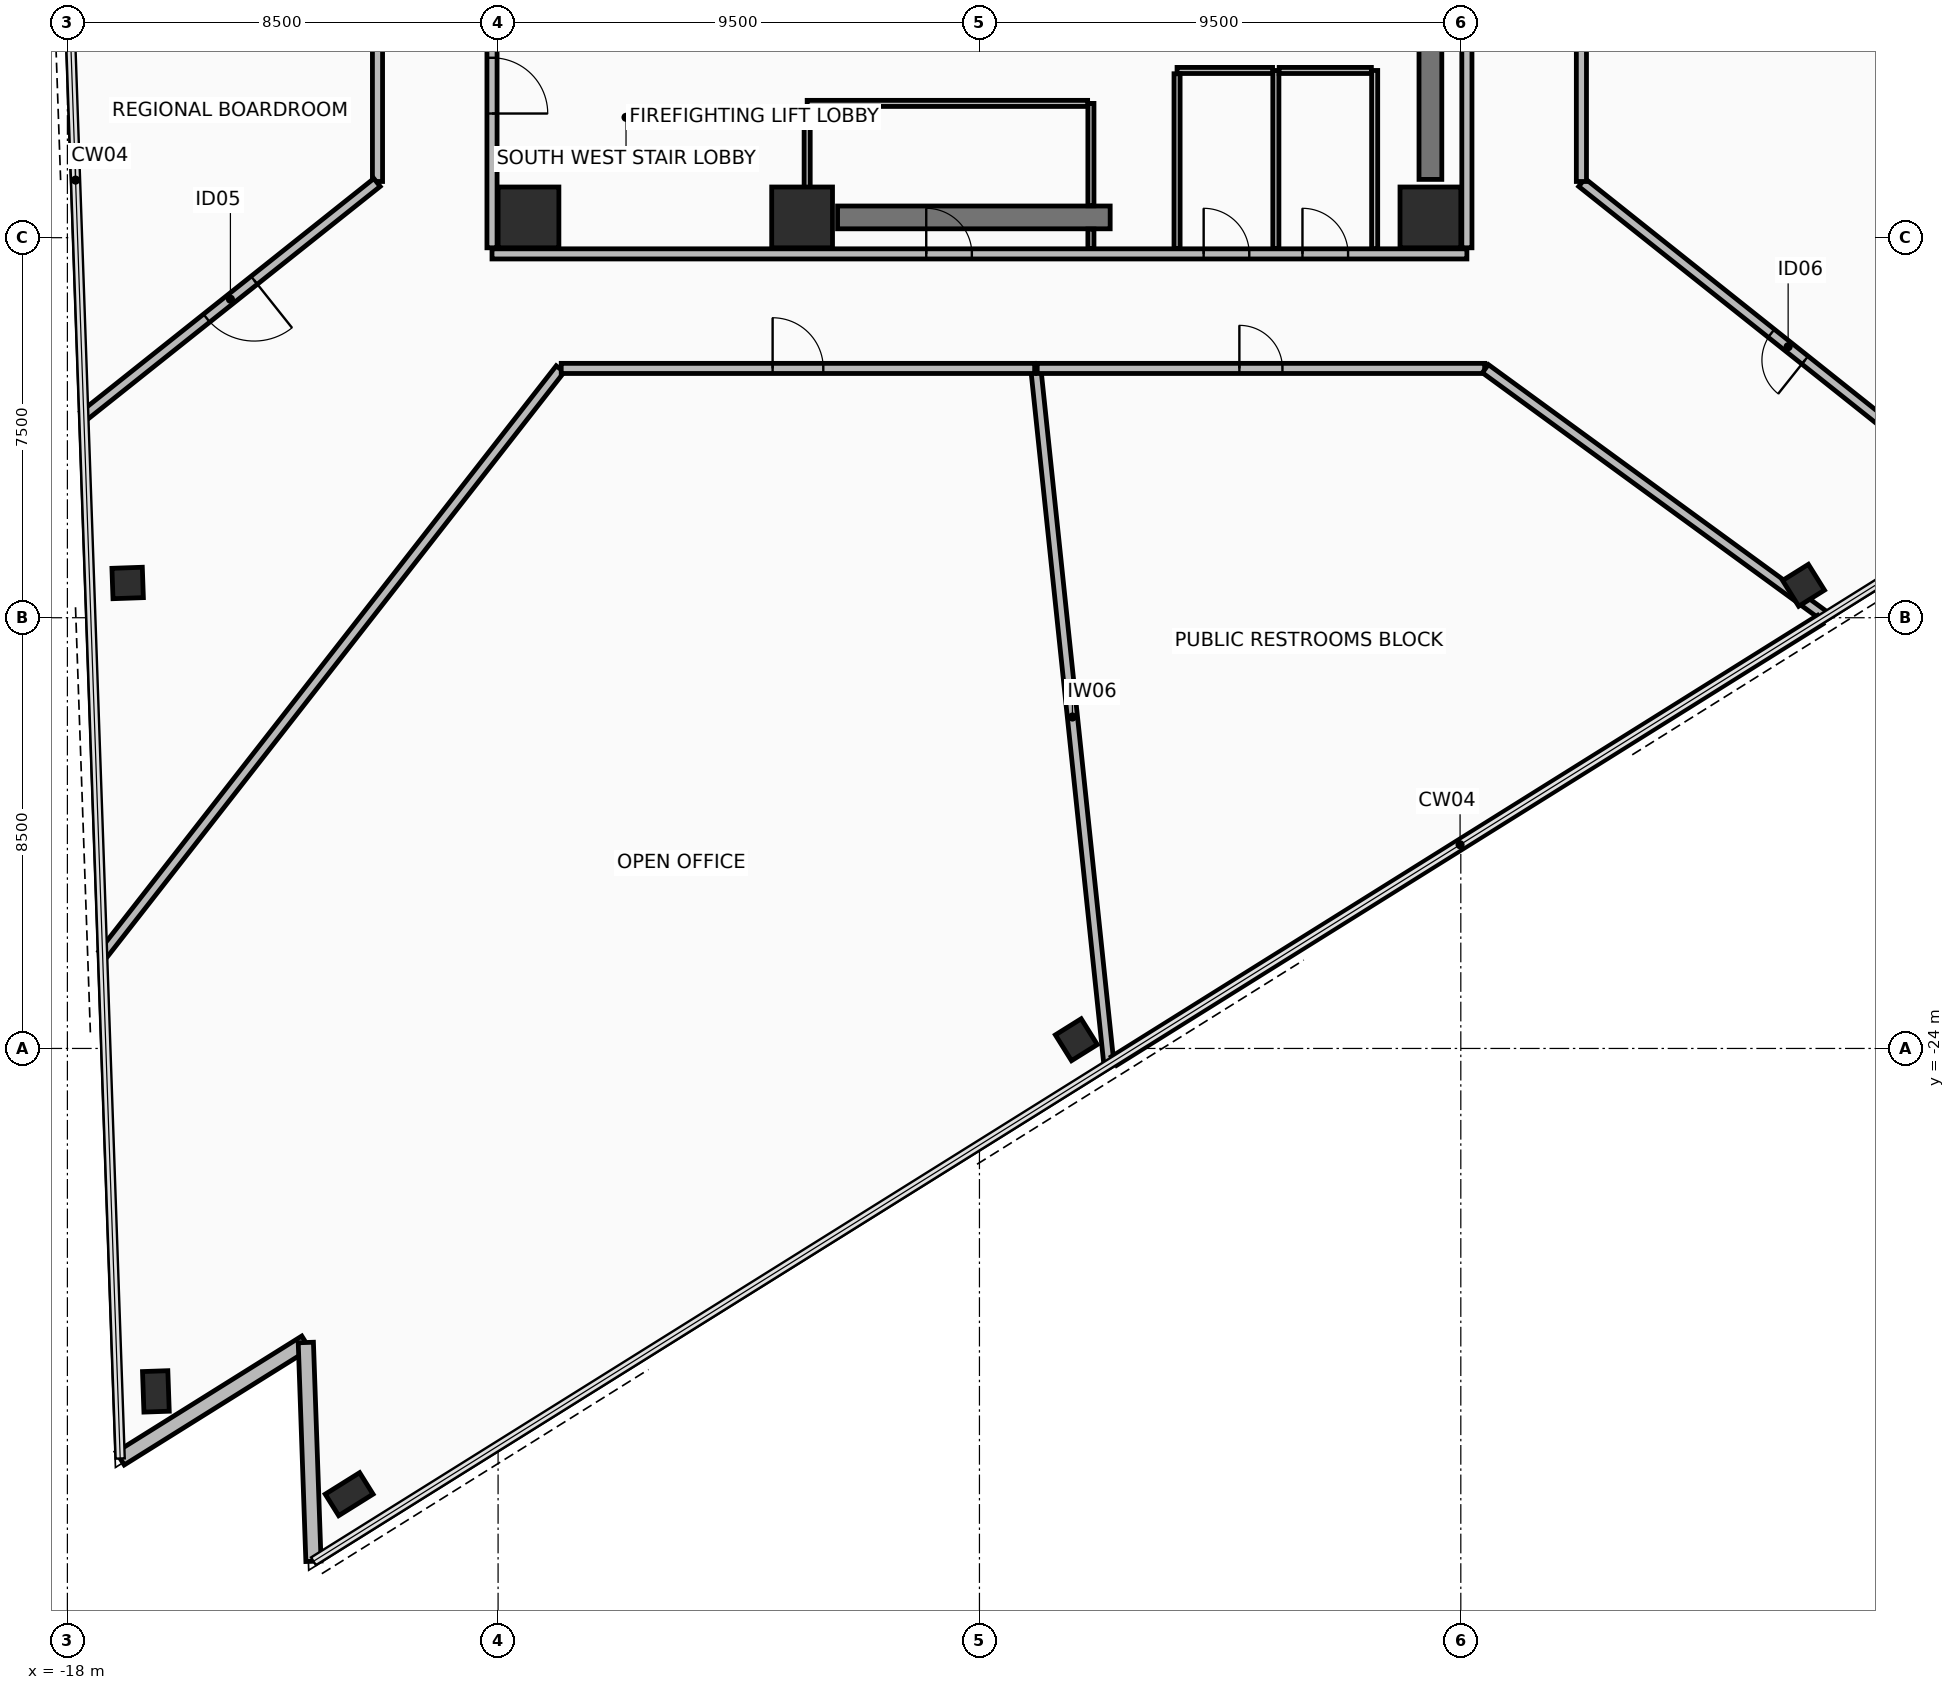
"""IFC4 building model, lengths in metres.
Left out: names, types, materials, properties, quantities, classifications, styles, units other than length and angle.
Written with IfcOpenShell. Run it as: python <this file> out.ifc"""

import sys

from ifc_helpers import new_model, si_unit, direction, frame, frame_2d, origin, origin_2d, place, context, subcontext, project, spatial, rectangle, hollow_rectangle, extrude, element, fill, save


model = new_model("IFC4")
c1 = context("Model", 3, precision=1e-05, world=origin(), true_north=direction((0.0, 1.0)))
c2 = subcontext(c1, "Body", "Model", "MODEL_VIEW")
j1 = project(units=[si_unit("LENGTHUNIT", "METRE"), si_unit("PLANEANGLEUNIT", "RADIAN")], contexts=[c1])
p1 = place(None, origin())
s1 = spatial("IfcSite", under=j1, at=p1, CompositionType="ELEMENT")
p2 = place(p1, origin())
s2 = spatial("IfcBuilding", under=s1, at=p2, CompositionType="ELEMENT")
p3 = place(p2, frame((0.0, 0.0, 146.0)))
s3 = spatial("IfcBuildingStorey", under=s2, at=p3, CompositionType="ELEMENT", Elevation=146.0)
for number, where, z_axis, x_axis in (
    (1, (-8.9, -7.6, 0.0), (0.0, 0.0, 1.0), (1.0, 0.0, 0.0)),
    (2, (-3.5, -7.6, 0.0), (0.0, 0.0, 1.0), (1.0, 0.0, 0.0)),
    (3, (8.9, -7.6, 0.0), (0.0, 0.0, 1.0), (1.0, 0.0, 0.0)),
):
    element("IfcColumn", number, at=place(p3, frame(where, z_axis=z_axis, x_axis=x_axis)), inside=s3, PredefinedType="COLUMN", context=c2, shape_type="SweptSolid", body=[
        extrude(rectangle(XDim=1.2, YDim=1.2, at=origin_2d()), origin(), (0.0, 0.0, 1.0), 3.6),
    ])
p4 = place(p3, frame((-16.811, -14.814, 0.0), z_axis=(0.0, 0.0, 1.0), x_axis=(-0.034899496703, 0.999390827019, 0.0)))
e4 = element("IfcColumn", 4, at=p4, inside=s3, PredefinedType="COLUMN", context=c2, shape_type="SweptSolid", body=[
    extrude(hollow_rectangle(XDim=0.6, YDim=0.6, WallThickness=0.036, at=origin_2d()), origin(), (0.0, 0.0, 1.0), 3.6),
])
for number, where, z_axis, x_axis in (
    (5, (-16.254, -30.768, 0.0), (0.0, 0.0, 1.0), (-0.035, 0.999, 0.0)),
    (6, (-12.439, -32.796, 0.0), (0.0, 0.0, 1.0), (0.848, 0.53, 0.0)),
):
    element("IfcColumn", number, at=place(p3, frame(where, z_axis=z_axis, x_axis=x_axis)), inside=s3, PredefinedType="COLUMN", context=c2, shape_type="SweptSolid", body=[
        extrude(hollow_rectangle(XDim=0.5, YDim=0.8, WallThickness=0.04, at=origin_2d()), origin(), (0.0, 0.0, 1.0), 3.6),
    ])
for number, where, z_axis, x_axis in (
    (7, (1.912, -23.828, 0.0), (0.0, 0.0, 1.0), (0.848, 0.53, 0.0)),
    (8, (16.264, -14.86, 0.0), (0.0, 0.0, 1.0), (0.848, 0.53, 0.0)),
):
    element("IfcColumn", number, at=place(p3, frame(where, z_axis=z_axis, x_axis=x_axis)), inside=s3, PredefinedType="COLUMN", context=c2, shape_type="SweptSolid", body=[
        extrude(hollow_rectangle(XDim=0.6, YDim=0.6, WallThickness=0.036, at=origin_2d()), origin(), (0.0, 0.0, 1.0), 3.6),
    ])
p5 = place(p3, frame((-16.958, -32.092, 0.0), z_axis=(0.0, 0.0, 1.0), x_axis=(0.848068146975, 0.529887174866, 0.0)))
e9 = element("IfcWall", 9, at=p5, inside=s3, PredefinedType="STANDARD", context=c2, shape_type="SweptSolid", body=[
    extrude(rectangle(XDim=4.32, YDim=0.3, at=frame_2d((2.16, 0.0))), origin(), (0.0, 0.0, 1.0), 2.705),
])
p6 = place(p3, frame((-13.294, -29.803, 0.0), z_axis=(0.0, 0.0, 1.0), x_axis=(0.034869079132, -0.999391888761, 0.0)))
e10 = element("IfcWall", 10, at=p6, inside=s3, PredefinedType="STANDARD", context=c2, shape_type="SweptSolid", body=[
    extrude(rectangle(XDim=4.32, YDim=0.3, at=frame_2d((2.16, 0.0))), origin(), (0.0, 0.0, 1.0), 2.705),
])
p7 = place(p3, frame((-2.8, -7.6, 0.0), z_axis=(0.0, 0.0, 1.0), x_axis=(1.0, 0.0, 0.0)))
e11 = element("IfcWall", 11, at=p7, inside=s3, PredefinedType="SHEAR", context=c2, shape_type="SweptSolid", body=[
    extrude(rectangle(XDim=5.38, YDim=0.45, at=frame_2d((2.69, 0.0))), origin(), (0.0, 0.0, 1.0), 3.41),
])
p8 = place(p3, frame((8.9, -6.85, 0.0), z_axis=(0.0, 0.0, 1.0), x_axis=(0.0, 1.0, 0.0)))
e12 = element("IfcWall", 12, at=p8, inside=s3, PredefinedType="SHEAR", context=c2, shape_type="SweptSolid", body=[
    extrude(rectangle(XDim=10.7, YDim=0.45, at=frame_2d((5.35, 0.0))), origin(), (0.0, 0.0, 1.0), 3.41),
])
p9 = place(p3, frame((-9.62, -8.32, 0.0), z_axis=(0.0, 0.0, 1.0), x_axis=(1.0, 0.0, 0.0)))
e13 = element("IfcWall", 13, at=p9, inside=s3, PredefinedType="PARTITIONING", context=c2, shape_type="SweptSolid", body=[
    extrude(rectangle(XDim=19.24, YDim=0.2, at=frame_2d((9.62, 0.0))), origin(), (0.0, 0.0, 1.0), 2.855),
])
p10 = place(p9, frame((8.57, 0.0, 0.0)))
e14 = element("IfcOpeningElement", 14, at=p10, cuts=e13, PredefinedType="OPENING", context=c2, shape_type="SweptSolid", body=[
    extrude(rectangle(XDim=0.9, YDim=2.1, at=frame_2d((0.45, 1.05))), frame((0.0, 0.11, 0.0), z_axis=(0.0, -1.0, 0.0), x_axis=(1.0, 0.0, 0.0)), (0.0, 0.0, 1.0), 0.22),
])
p11 = place(p9, frame((14.045, 0.0, 0.0)))
e15 = element("IfcOpeningElement", 15, at=p11, cuts=e13, PredefinedType="OPENING", context=c2, shape_type="SweptSolid", body=[
    extrude(rectangle(XDim=0.9, YDim=2.1, at=frame_2d((0.45, 1.05))), frame((0.0, 0.11, 0.0), z_axis=(0.0, -1.0, 0.0), x_axis=(1.0, 0.0, 0.0)), (0.0, 0.0, 1.0), 0.22),
])
p12 = place(p9, frame((15.995, 0.0, 0.0)))
e16 = element("IfcOpeningElement", 16, at=p12, cuts=e13, PredefinedType="OPENING", context=c2, shape_type="SweptSolid", body=[
    extrude(rectangle(XDim=0.9, YDim=2.1, at=frame_2d((0.45, 1.05))), frame((0.0, 0.11, 0.0), z_axis=(0.0, -1.0, 0.0), x_axis=(1.0, 0.0, 0.0)), (0.0, 0.0, 1.0), 0.22),
])
p13 = place(p3, frame((-9.62, 8.2, 0.0), z_axis=(0.0, 0.0, 1.0), x_axis=(0.0, -1.0, 0.0)))
e17 = element("IfcWall", 17, at=p13, inside=s3, PredefinedType="PARTITIONING", context=c2, shape_type="SweptSolid", body=[
    extrude(rectangle(XDim=16.4, YDim=0.2, at=frame_2d((8.2, 0.0))), origin(), (0.0, 0.0, 1.0), 2.855),
])
p14 = place(p13, frame((12.65, 0.0, 0.0)))
e18 = element("IfcOpeningElement", 18, at=p14, cuts=e17, PredefinedType="OPENING", context=c2, shape_type="SweptSolid", body=[
    extrude(rectangle(XDim=1.1, YDim=2.15, at=frame_2d((0.55, 1.075))), frame((0.0, 0.11, 0.0), z_axis=(0.0, -1.0, 0.0), x_axis=(1.0, 0.0, 0.0)), (0.0, 0.0, 1.0), 0.22),
])
p15 = place(p3, frame((9.62, -8.2, 0.0), z_axis=(0.0, 0.0, 1.0), x_axis=(0.0, 1.0, 0.0)))
e19 = element("IfcWall", 19, at=p15, inside=s3, PredefinedType="PARTITIONING", context=c2, shape_type="SweptSolid", body=[
    extrude(rectangle(XDim=16.4, YDim=0.2, at=frame_2d((8.2, 0.0))), origin(), (0.0, 0.0, 1.0), 2.855),
])
p16 = place(p15, frame((12.65, 0.0, 0.0)))
e20 = element("IfcOpeningElement", 20, at=p16, cuts=e19, PredefinedType="OPENING", context=c2, shape_type="SweptSolid", body=[
    extrude(rectangle(XDim=1.1, YDim=2.15, at=frame_2d((0.55, 1.075))), frame((0.0, 0.11, 0.0), z_axis=(0.0, -1.0, 0.0), x_axis=(1.0, 0.0, 0.0)), (0.0, 0.0, 1.0), 0.22),
])
p17 = place(p3, frame((2.2, -8.215, 0.0), z_axis=(0.0, 0.0, 1.0), x_axis=(0.0, 1.0, 0.0)))
e21 = element("IfcWall", 21, at=p17, inside=s3, PredefinedType="PARTITIONING", context=c2, shape_type="SweptSolid", body=[
    extrude(rectangle(XDim=0.385, YDim=0.12, at=frame_2d((0.192, 0.0))), origin(), (0.0, 0.0, 1.0), 2.605),
])
p18 = place(p3, frame((2.2, -7.37, 0.0), z_axis=(0.0, 0.0, 1.0), x_axis=(0.0, 1.0, 0.0)))
e22 = element("IfcWall", 22, at=p18, inside=s3, PredefinedType="PARTITIONING", context=c2, shape_type="SweptSolid", body=[
    extrude(rectangle(XDim=2.02, YDim=0.12, at=frame_2d((1.01, 0.0))), origin(), (0.0, 0.0, 1.0), 2.605),
])
p19 = place(p3, frame((2.135, -5.35, 0.0), z_axis=(0.0, 0.0, 1.0), x_axis=(-1.0, 0.0, 0.0)))
e23 = element("IfcWall", 23, at=p19, inside=s3, PredefinedType="PARTITIONING", context=c2, shape_type="SweptSolid", body=[
    extrude(rectangle(XDim=5.535, YDim=0.12, at=frame_2d((2.768, 0.0))), origin(), (0.0, 0.0, 1.0), 2.605),
])
p20 = place(p3, frame((-3.4, -5.415, 0.0), z_axis=(0.0, 0.0, 1.0), x_axis=(0.0, -1.0, 0.0)))
e24 = element("IfcWall", 24, at=p20, inside=s3, PredefinedType="PARTITIONING", context=c2, shape_type="SweptSolid", body=[
    extrude(rectangle(XDim=2.8, YDim=0.12, at=frame_2d((1.4, 0.0))), origin(), (0.0, 0.0, 1.0), 2.605),
])
p21 = place(p3, frame((5.85, -8.215, 0.0), z_axis=(0.0, 0.0, 1.0), x_axis=(0.0, 1.0, 0.0)))
e25 = element("IfcWall", 25, at=p21, inside=s3, PredefinedType="PARTITIONING", context=c2, shape_type="SweptSolid", body=[
    extrude(rectangle(XDim=3.515, YDim=0.12, at=frame_2d((1.758, 0.0))), origin(), (0.0, 0.0, 1.0), 2.605),
])
p22 = place(p3, frame((5.785, -4.7, 0.0), z_axis=(0.0, 0.0, 1.0), x_axis=(-1.0, 0.0, 0.0)))
e26 = element("IfcWall", 26, at=p22, inside=s3, PredefinedType="PARTITIONING", context=c2, shape_type="SweptSolid", body=[
    extrude(rectangle(XDim=1.885, YDim=0.12, at=frame_2d((0.942, 0.0))), origin(), (0.0, 0.0, 1.0), 3.41),
])
p23 = place(p3, frame((3.9, -4.765, 0.0), z_axis=(0.0, 0.0, 1.0), x_axis=(0.0, -1.0, 0.0)))
e27 = element("IfcWall", 27, at=p23, inside=s3, PredefinedType="PARTITIONING", context=c2, shape_type="SweptSolid", body=[
    extrude(rectangle(XDim=3.45, YDim=0.12, at=frame_2d((1.725, 0.0))), origin(), (0.0, 0.0, 1.0), 2.605),
])
p24 = place(p3, frame((7.8, -8.215, 0.0), z_axis=(0.0, 0.0, 1.0), x_axis=(0.0, 1.0, 0.0)))
e28 = element("IfcWall", 28, at=p24, inside=s3, PredefinedType="PARTITIONING", context=c2, shape_type="SweptSolid", body=[
    extrude(rectangle(XDim=3.515, YDim=0.12, at=frame_2d((1.758, 0.0))), origin(), (0.0, 0.0, 1.0), 2.605),
])
p25 = place(p3, frame((7.735, -4.7, 0.0), z_axis=(0.0, 0.0, 1.0), x_axis=(-1.0, 0.0, 0.0)))
e29 = element("IfcWall", 29, at=p25, inside=s3, PredefinedType="PARTITIONING", context=c2, shape_type="SweptSolid", body=[
    extrude(rectangle(XDim=1.82, YDim=0.12, at=frame_2d((0.91, 0.0))), origin(), (0.0, 0.0, 1.0), 3.41),
])
p26 = place(p3, frame((2.555, -24.311, 0.0), z_axis=(0.0, 0.0, 1.0), x_axis=(-0.104523371889, 0.994522430481, 0.0)))
e30 = element("IfcWall", 30, at=p26, inside=s3, PredefinedType="PARTITIONING", context=c2, shape_type="SweptSolid", body=[
    extrude(rectangle(XDim=13.779, YDim=0.2, at=frame_2d((6.889, 0.0))), origin(), (0.0, 0.0, 1.0), 2.705),
])
p27 = place(p3, frame((1.14, -10.58, 0.0), z_axis=(0.0, 0.0, 1.0), x_axis=(1.0, 0.0, 0.0)))
e31 = element("IfcWall", 31, at=p27, inside=s3, PredefinedType="PARTITIONING", context=c2, shape_type="SweptSolid", body=[
    extrude(rectangle(XDim=8.83, YDim=0.2, at=frame_2d((4.415, 0.0))), origin(), (0.0, 0.0, 1.0), 3.41),
])
p28 = place(p27, frame((3.99, 0.0, 0.0)))
e32 = element("IfcOpeningElement", 32, at=p28, cuts=e31, PredefinedType="OPENING", context=c2, shape_type="SweptSolid", body=[
    extrude(rectangle(XDim=0.85, YDim=2.1, at=frame_2d((0.425, 1.05))), frame((0.0, 0.11, 0.0), z_axis=(0.0, -1.0, 0.0), x_axis=(1.0, 0.0, 0.0)), (0.0, 0.0, 1.0), 0.22),
])
p29 = place(p3, frame((9.985, -10.585, 0.0), z_axis=(0.0, 0.0, 1.0), x_axis=(0.807835985814, -0.589407346429, 0.0)))
e33 = element("IfcWall", 33, at=p29, inside=s3, PredefinedType="PARTITIONING", context=c2, shape_type="SweptSolid", body=[
    extrude(rectangle(XDim=8.301, YDim=0.2, at=frame_2d((4.151, 0.0))), origin(), (0.0, 0.0, 1.0), 2.705),
])
p30 = place(p3, frame((16.595, -15.538, 0.0), z_axis=(0.0, 0.0, 1.0), x_axis=(-0.84805002989, -0.5299161696, 0.0)))
e34 = element("IfcWall", 34, at=p30, inside=s3, PredefinedType="PARTITIONING", context=c2, shape_type="SweptSolid", body=[
    extrude(rectangle(XDim=16.439, YDim=0.2, at=frame_2d((8.219, 0.0))), origin(), (0.0, 0.0, 1.0), 3.41),
])
p31 = place(p3, frame((20.03, -13.391, 0.0), z_axis=(0.0, 0.0, 1.0), x_axis=(-0.782379652936, 0.622801797261, 0.0)))
e35 = element("IfcWall", 35, at=p31, inside=s3, PredefinedType="PARTITIONING", context=c2, shape_type="SweptSolid", body=[
    extrude(rectangle(XDim=10.405, YDim=0.2, at=frame_2d((5.203, 0.0))), origin(), (0.0, 0.0, 1.0), 2.705),
])
p32 = place(p31, frame((4.777, 0.0, 0.0)))
e36 = element("IfcOpeningElement", 36, at=p32, cuts=e35, PredefinedType="OPENING", context=c2, shape_type="SweptSolid", body=[
    extrude(rectangle(XDim=0.85, YDim=2.1, at=frame_2d((0.425, 1.05))), frame((0.0, 0.11, 0.0), z_axis=(0.0, -1.0, 0.0), x_axis=(1.0, 0.0, 0.0)), (0.0, 0.0, 1.0), 0.22),
])
p33 = place(p3, frame((11.88, -6.891, 0.0), z_axis=(0.0, 0.0, 1.0), x_axis=(0.0, 1.0, 0.0)))
e37 = element("IfcWall", 37, at=p33, inside=s3, PredefinedType="PARTITIONING", context=c2, shape_type="SweptSolid", body=[
    extrude(rectangle(XDim=6.451, YDim=0.2, at=frame_2d((3.225, 0.0))), origin(), (0.0, 0.0, 1.0), 2.855),
])
p34 = place(p3, frame((-11.88, -1.698, 0.0), z_axis=(0.0, 0.0, 1.0), x_axis=(0.0, -1.0, 0.0)))
e38 = element("IfcWall", 38, at=p34, inside=s3, PredefinedType="PARTITIONING", context=c2, shape_type="SweptSolid", body=[
    extrude(rectangle(XDim=5.193, YDim=0.2, at=frame_2d((2.596, 0.0))), origin(), (0.0, 0.0, 1.0), 3.41),
])
p35 = place(p3, frame((-11.889, -6.911, 0.0), z_axis=(0.0, 0.0, 1.0), x_axis=(-0.782386471956, -0.622793230936, 0.0)))
e39 = element("IfcWall", 39, at=p35, inside=s3, PredefinedType="PARTITIONING", context=c2, shape_type="SweptSolid", body=[
    extrude(rectangle(XDim=7.396, YDim=0.2, at=frame_2d((3.698, 0.0))), origin(), (0.0, 0.0, 1.0), 2.705),
])
p36 = place(p35, frame((3.098, 0.0, 0.0)))
e40 = element("IfcOpeningElement", 40, at=p36, cuts=e39, PredefinedType="OPENING", context=c2, shape_type="SweptSolid", body=[
    extrude(rectangle(XDim=1.2, YDim=2.15, at=frame_2d((0.6, 1.075))), frame((0.0, 0.11, 0.0), z_axis=(0.0, -1.0, 0.0), x_axis=(1.0, 0.0, 0.0)), (0.0, 0.0, 1.0), 0.22),
])
p37 = place(p3, frame((-17.299, -22.142, 0.0), z_axis=(0.0, 0.0, 1.0), x_axis=(0.615665047481, 0.78800796272, 0.0)))
e41 = element("IfcWall", 41, at=p37, inside=s3, PredefinedType="PARTITIONING", context=c2, shape_type="SweptSolid", body=[
    extrude(rectangle(XDim=14.66, YDim=0.2, at=frame_2d((7.33, 0.0))), origin(), (0.0, 0.0, 1.0), 2.705),
])
p38 = place(p3, frame((-8.254, -10.58, 0.0), z_axis=(0.0, 0.0, 1.0), x_axis=(1.0, 0.0, 0.0)))
e42 = element("IfcWall", 42, at=p38, inside=s3, PredefinedType="PARTITIONING", context=c2, shape_type="SweptSolid", body=[
    extrude(rectangle(XDim=9.344, YDim=0.2, at=frame_2d((4.672, 0.0))), origin(), (0.0, 0.0, 1.0), 2.855),
])
p39 = place(p38, frame((4.172, 0.0, 0.0)))
e43 = element("IfcOpeningElement", 43, at=p39, cuts=e42, PredefinedType="OPENING", context=c2, shape_type="SweptSolid", body=[
    extrude(rectangle(XDim=1.0, YDim=2.15, at=frame_2d((0.5, 1.075))), frame((0.0, 0.11, 0.0), z_axis=(0.0, -1.0, 0.0), x_axis=(1.0, 0.0, 0.0)), (0.0, 0.0, 1.0), 0.22),
])
p40 = place(p14, frame((1.1, 0.0, 0.0), z_axis=(0.0, 0.0, 1.0), x_axis=(-1.0, 0.0, 0.0)))
e44 = element("IfcDoor", 44, at=p40, inside=s3, OperationType="SINGLE_SWING_LEFT", PredefinedType="DOOR", context=c2, shape_type="SweptSolid", body=[
    extrude(rectangle(XDim=1.1, YDim=2.15, at=frame_2d((0.55, 1.075))), frame((0.0, 0.025, 0.0), z_axis=(0.0, -1.0, 0.0), x_axis=(1.0, 0.0, 0.0)), (0.0, 0.0, 1.0), 0.05),
])
fill(e18, e44)
p41 = place(p10, origin())
e45 = element("IfcDoor", 45, at=p41, inside=s3, OperationType="SINGLE_SWING_LEFT", PredefinedType="DOOR", context=c2, shape_type="SweptSolid", body=[
    extrude(rectangle(XDim=0.9, YDim=2.1, at=frame_2d((0.45, 1.05))), frame((0.0, 0.025, 0.0), z_axis=(0.0, -1.0, 0.0), x_axis=(1.0, 0.0, 0.0)), (0.0, 0.0, 1.0), 0.05),
])
fill(e14, e45)
p42 = place(p11, origin())
e46 = element("IfcDoor", 46, at=p42, inside=s3, OperationType="SINGLE_SWING_LEFT", PredefinedType="DOOR", context=c2, shape_type="SweptSolid", body=[
    extrude(rectangle(XDim=0.9, YDim=2.1, at=frame_2d((0.45, 1.05))), frame((0.0, 0.025, 0.0), z_axis=(0.0, -1.0, 0.0), x_axis=(1.0, 0.0, 0.0)), (0.0, 0.0, 1.0), 0.05),
])
fill(e15, e46)
p43 = place(p12, origin())
e47 = element("IfcDoor", 47, at=p43, inside=s3, OperationType="SINGLE_SWING_LEFT", PredefinedType="DOOR", context=c2, shape_type="SweptSolid", body=[
    extrude(rectangle(XDim=0.9, YDim=2.1, at=frame_2d((0.45, 1.05))), frame((0.0, 0.025, 0.0), z_axis=(0.0, -1.0, 0.0), x_axis=(1.0, 0.0, 0.0)), (0.0, 0.0, 1.0), 0.05),
])
fill(e16, e47)
p44 = place(p28, origin())
e48 = element("IfcDoor", 48, at=p44, inside=s3, OperationType="SINGLE_SWING_RIGHT", PredefinedType="DOOR", context=c2, shape_type="SweptSolid", body=[
    extrude(rectangle(XDim=0.85, YDim=2.1, at=frame_2d((0.425, 1.05))), frame((0.0, 0.025, 0.0), z_axis=(0.0, -1.0, 0.0), x_axis=(1.0, 0.0, 0.0)), (0.0, 0.0, 1.0), 0.05),
])
fill(e32, e48)
p45 = place(p32, origin())
e49 = element("IfcDoor", 49, at=p45, inside=s3, OperationType="SINGLE_SWING_RIGHT", PredefinedType="DOOR", context=c2, shape_type="SweptSolid", body=[
    extrude(rectangle(XDim=0.85, YDim=2.1, at=frame_2d((0.425, 1.05))), frame((0.0, 0.025, 0.0), z_axis=(0.0, -1.0, 0.0), x_axis=(1.0, 0.0, 0.0)), (0.0, 0.0, 1.0), 0.05),
])
fill(e36, e49)
p46 = place(p36, origin())
e50 = element("IfcDoor", 50, at=p46, inside=s3, OperationType="SINGLE_SWING_LEFT", PredefinedType="DOOR", context=c2, shape_type="SweptSolid", body=[
    extrude(rectangle(XDim=1.2, YDim=2.15, at=frame_2d((0.6, 1.075))), frame((0.0, 0.025, 0.0), z_axis=(0.0, -1.0, 0.0), x_axis=(1.0, 0.0, 0.0)), (0.0, 0.0, 1.0), 0.05),
])
fill(e40, e50)
p47 = place(p39, origin())
e51 = element("IfcDoor", 51, at=p47, inside=s3, OperationType="SINGLE_SWING_RIGHT", PredefinedType="DOOR", context=c2, shape_type="SweptSolid", body=[
    extrude(rectangle(XDim=1.0, YDim=2.15, at=frame_2d((0.5, 1.075))), frame((0.0, 0.025, 0.0), z_axis=(0.0, -1.0, 0.0), x_axis=(1.0, 0.0, 0.0)), (0.0, 0.0, 1.0), 0.05),
])
fill(e43, e51)
save(model, sys.argv[1])
